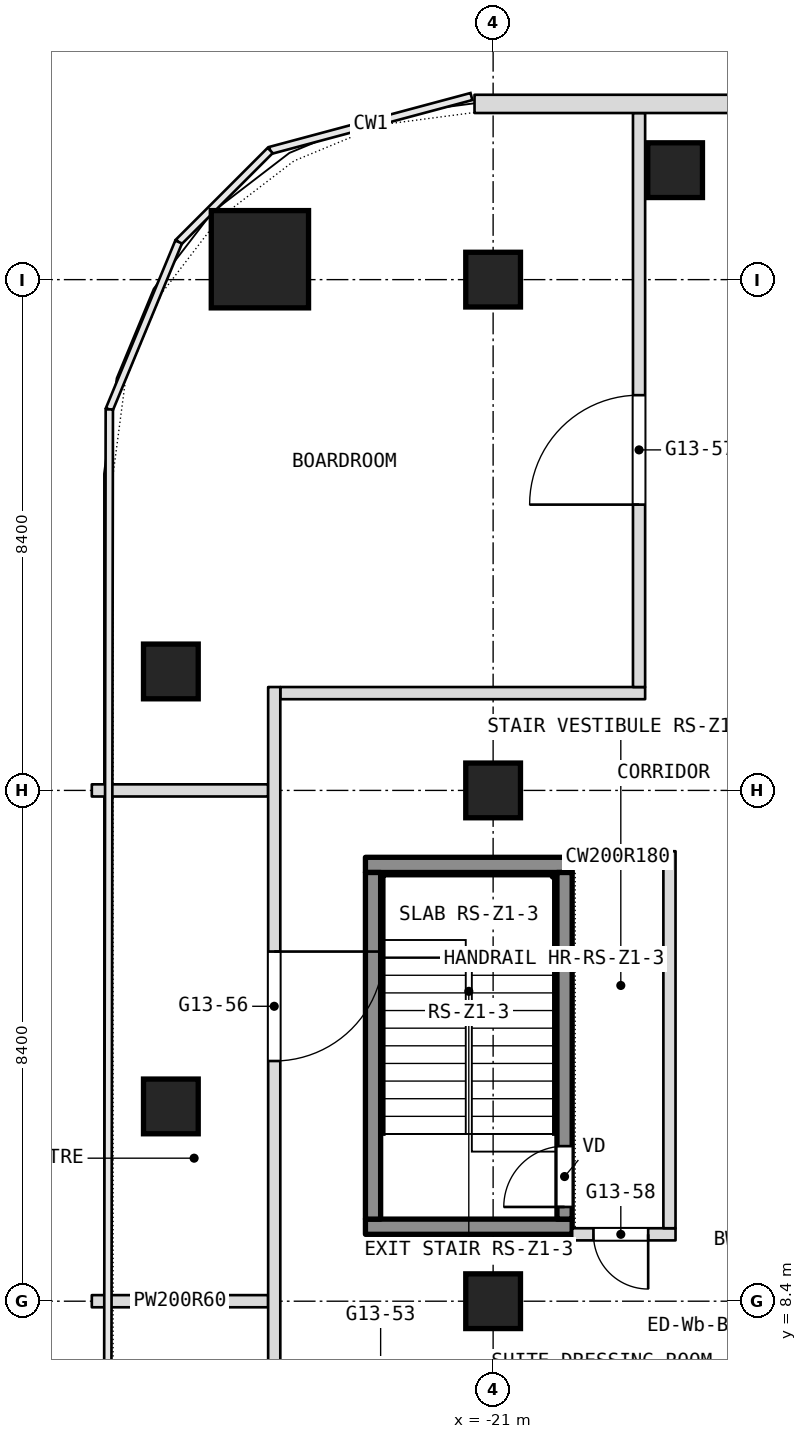
"""IFC4 building model, lengths in metres.
Left out: names, types, materials, properties, quantities, classifications, styles, units other than length and angle.
Written with IfcOpenShell. Run it as: python <this file> out.ifc"""

import sys

from ifc_helpers import new_model, si_unit, direction, frame, frame_2d, origin, origin_2d, place, context, subcontext, project, spatial, rectangle, extrude, element, fill, save


model = new_model("IFC4")
c1 = context("Model", 3, precision=1e-05, world=origin(), true_north=direction((0.0, 1.0)))
c2 = subcontext(c1, "Body", "Model", "MODEL_VIEW")
j1 = project(units=[si_unit("LENGTHUNIT", "METRE"), si_unit("PLANEANGLEUNIT", "RADIAN")], contexts=[c1])
p1 = place(None, origin())
s1 = spatial("IfcSite", under=j1, at=p1, CompositionType="ELEMENT")
p2 = place(p1, origin())
s2 = spatial("IfcBuilding", under=s1, at=p2, CompositionType="ELEMENT")
p3 = place(p2, frame((0.0, 0.0, 155.3)))
s3 = spatial("IfcBuildingStorey", under=s2, at=p3, CompositionType="ELEMENT", Elevation=155.3)
p4 = place(p3, frame((-24.835, 25.535, 0.0), z_axis=(0.0, 0.0, 1.0), x_axis=(1.0, 0.0, 0.0)))
e1 = element("IfcColumn", 1, at=p4, inside=s3, PredefinedType="COLUMN", context=c2, shape_type="SweptSolid", body=[
    extrude(rectangle(XDim=1.6, YDim=1.6, at=origin_2d()), origin(), (0.0, 0.0, 1.0), 3.6),
])
for number, where, z_axis, x_axis in (
    (2, (-21.0, 8.4, 0.0), (0.0, 0.0, 1.0), (1.0, 0.0, 0.0)),
    (3, (-21.0, 16.8, 0.0), (0.0, 0.0, 1.0), (1.0, 0.0, 0.0)),
    (4, (-21.0, 25.2, 0.0), (0.0, 0.0, 1.0), (1.0, 0.0, 0.0)),
    (5, (-26.3, 11.603, 0.0), (0.0, 0.0, 1.0), (1.0, 0.0, 0.0)),
    (6, (-26.3, 18.756, 0.0), (0.0, 0.0, 1.0), (1.0, 0.0, 0.0)),
    (7, (-18.007, 27.0, 0.0), (0.0, 0.0, 1.0), (1.0, 0.0, 0.0)),
):
    element("IfcColumn", number, at=place(p3, frame(where, z_axis=z_axis, x_axis=x_axis)), inside=s3, PredefinedType="COLUMN", context=c2, shape_type="SweptSolid", body=[
        extrude(rectangle(XDim=0.9, YDim=0.9, at=origin_2d()), origin(), (0.0, 0.0, 1.0), 3.6),
    ])
p5 = place(p3, frame((-27.6, 8.4, 0.0), z_axis=(0.0, 0.0, 1.0), x_axis=(1.0, 0.0, 0.0)))
e8 = element("IfcWall", 8, at=p5, inside=s3, PredefinedType="PARTITIONING", context=c2, shape_type="SweptSolid", body=[
    extrude(rectangle(XDim=2.9, YDim=0.2, at=frame_2d((1.45, 0.0))), origin(), (0.0, 0.0, 1.0), 2.89),
])
p6 = place(p3, frame((-19.7, 9.5, 0.0), z_axis=(0.0, 0.0, 1.0), x_axis=(1.0, 0.0, 0.0)))
e9 = element("IfcWall", 9, at=p6, inside=s3, PredefinedType="PARTITIONING", context=c2, shape_type="SweptSolid", body=[
    extrude(rectangle(XDim=1.7, YDim=0.2, at=frame_2d((0.85, 0.0))), origin(), (0.0, 0.0, 1.0), 3.34),
])
p7 = place(p6, frame((0.35, 0.0, 0.0)))
e10 = element("IfcOpeningElement", 10, at=p7, cuts=e9, PredefinedType="OPENING", context=c2, shape_type="SweptSolid", body=[
    extrude(rectangle(XDim=0.9, YDim=2.1, at=frame_2d((0.45, 1.05))), frame((0.0, 0.1, 0.0), z_axis=(0.0, -1.0, 0.0), x_axis=(1.0, 0.0, 0.0)), (0.0, 0.0, 1.0), 0.2),
])
p8 = place(p3, frame((-19.7, 15.7, 0.0), z_axis=(0.0, 0.0, 1.0), x_axis=(1.0, 0.0, 0.0)))
e11 = element("IfcWall", 11, at=p8, inside=s3, PredefinedType="PARTITIONING", context=c2, shape_type="SweptSolid", body=[
    extrude(rectangle(XDim=1.5, YDim=0.2, at=frame_2d((0.75, 0.0))), origin(), (0.0, 0.0, 1.0), 3.34),
])
p9 = place(p3, frame((-27.6, 16.8, 0.0), z_axis=(0.0, 0.0, 1.0), x_axis=(1.0, 0.0, 0.0)))
e12 = element("IfcWall", 12, at=p9, inside=s3, PredefinedType="PARTITIONING", context=c2, shape_type="SweptSolid", body=[
    extrude(rectangle(XDim=2.9, YDim=0.2, at=frame_2d((1.45, 0.0))), origin(), (0.0, 0.0, 1.0), 2.89),
])
p10 = place(p3, frame((-18.1, 9.6, 0.0), z_axis=(0.0, 0.0, 1.0), x_axis=(0.0, 1.0, 0.0)))
e13 = element("IfcWall", 13, at=p10, inside=s3, PredefinedType="PARTITIONING", context=c2, shape_type="SweptSolid", body=[
    extrude(rectangle(XDim=6.2, YDim=0.2, at=frame_2d((3.1, 0.0))), origin(), (0.0, 0.0, 1.0), 3.34),
])
p11 = place(p3, frame((-24.5, 18.4, 0.0), z_axis=(0.0, 0.0, 1.0), x_axis=(1.0, 0.0, 0.0)))
e14 = element("IfcWall", 14, at=p11, inside=s3, PredefinedType="PARTITIONING", context=c2, shape_type="SweptSolid", body=[
    extrude(rectangle(XDim=6.0, YDim=0.2, at=frame_2d((3.0, 0.0))), origin(), (0.0, 0.0, 1.0), 3.34),
])
p12 = place(p3, frame((-18.6, 18.5, 0.0), z_axis=(0.0, 0.0, 1.0), x_axis=(0.0, 1.0, 0.0)))
e15 = element("IfcWall", 15, at=p12, inside=s3, PredefinedType="PARTITIONING", context=c2, shape_type="SweptSolid", body=[
    extrude(rectangle(XDim=9.44, YDim=0.2, at=frame_2d((4.72, 0.0))), origin(), (0.0, 0.0, 1.0), 3.34),
])
p13 = place(p12, frame((3.0, 0.0, 0.0)))
e16 = element("IfcOpeningElement", 16, at=p13, cuts=e15, PredefinedType="OPENING", context=c2, shape_type="SweptSolid", body=[
    extrude(rectangle(XDim=1.8, YDim=2.1, at=frame_2d((0.9, 1.05))), frame((0.0, 0.1, 0.0), z_axis=(0.0, -1.0, 0.0), x_axis=(1.0, 0.0, 0.0)), (0.0, 0.0, 1.0), 0.2),
])
p14 = place(p3, frame((-24.6, 6.9, 0.0), z_axis=(0.0, 0.0, 1.0), x_axis=(0.0, 1.0, 0.0)))
e17 = element("IfcWall", 17, at=p14, inside=s3, PredefinedType="PARTITIONING", context=c2, shape_type="SweptSolid", body=[
    extrude(rectangle(XDim=11.6, YDim=0.2, at=frame_2d((5.8, 0.0))), origin(), (0.0, 0.0, 1.0), 3.34),
])
p15 = place(p14, frame((5.45, 0.0, 0.0)))
e18 = element("IfcOpeningElement", 18, at=p15, cuts=e17, PredefinedType="OPENING", context=c2, shape_type="SweptSolid", body=[
    extrude(rectangle(XDim=1.8, YDim=2.1, at=frame_2d((0.9, 1.05))), frame((0.0, 0.1, 0.0), z_axis=(0.0, -1.0, 0.0), x_axis=(1.0, 0.0, 0.0)), (0.0, 0.0, 1.0), 0.2),
])
p16 = place(p3, frame((21.306, 28.09, 0.0), z_axis=(0.0, 0.0, 1.0), x_axis=(-1.0, 0.0, 0.0)))
e19 = element("IfcWall", 19, at=p16, inside=s3, PredefinedType="NOTDEFINED", context=c2, shape_type="SweptSolid", body=[
    extrude(rectangle(XDim=42.612, YDim=0.3, at=frame_2d((21.306, 0.0))), origin(), (0.0, 0.0, 1.0), 3.6),
])
p17 = place(p16, frame((5.406, 0.0, 0.9)))
e20 = element("IfcOpeningElement", 20, at=p17, cuts=e19, PredefinedType="OPENING", context=c2, shape_type="SweptSolid", body=[
    extrude(rectangle(XDim=2.4, YDim=2.1, at=frame_2d((1.2, 1.05))), frame((0.0, 0.15, 0.0), z_axis=(0.0, -1.0, 0.0), x_axis=(1.0, 0.0, 0.0)), (0.0, 0.0, 1.0), 0.3),
])
p18 = place(p16, frame((9.606, 0.0, 0.9)))
e21 = element("IfcOpeningElement", 21, at=p18, cuts=e19, PredefinedType="OPENING", context=c2, shape_type="SweptSolid", body=[
    extrude(rectangle(XDim=2.4, YDim=2.1, at=frame_2d((1.2, 1.05))), frame((0.0, 0.15, 0.0), z_axis=(0.0, -1.0, 0.0), x_axis=(1.0, 0.0, 0.0)), (0.0, 0.0, 1.0), 0.3),
])
p19 = place(p16, frame((13.806, 0.0, 0.9)))
e22 = element("IfcOpeningElement", 22, at=p19, cuts=e19, PredefinedType="OPENING", context=c2, shape_type="SweptSolid", body=[
    extrude(rectangle(XDim=2.4, YDim=2.1, at=frame_2d((1.2, 1.05))), frame((0.0, 0.15, 0.0), z_axis=(0.0, -1.0, 0.0), x_axis=(1.0, 0.0, 0.0)), (0.0, 0.0, 1.0), 0.3),
])
p20 = place(p16, frame((18.006, 0.0, 0.9)))
e23 = element("IfcOpeningElement", 23, at=p20, cuts=e19, PredefinedType="OPENING", context=c2, shape_type="SweptSolid", body=[
    extrude(rectangle(XDim=2.4, YDim=2.1, at=frame_2d((1.2, 1.05))), frame((0.0, 0.15, 0.0), z_axis=(0.0, -1.0, 0.0), x_axis=(1.0, 0.0, 0.0)), (0.0, 0.0, 1.0), 0.3),
])
p21 = place(p16, frame((22.206, 0.0, 0.9)))
e24 = element("IfcOpeningElement", 24, at=p21, cuts=e19, PredefinedType="OPENING", context=c2, shape_type="SweptSolid", body=[
    extrude(rectangle(XDim=2.4, YDim=2.1, at=frame_2d((1.2, 1.05))), frame((0.0, 0.15, 0.0), z_axis=(0.0, -1.0, 0.0), x_axis=(1.0, 0.0, 0.0)), (0.0, 0.0, 1.0), 0.3),
])
p22 = place(p16, frame((26.406, 0.0, 0.9)))
e25 = element("IfcOpeningElement", 25, at=p22, cuts=e19, PredefinedType="OPENING", context=c2, shape_type="SweptSolid", body=[
    extrude(rectangle(XDim=2.4, YDim=2.1, at=frame_2d((1.2, 1.05))), frame((0.0, 0.15, 0.0), z_axis=(0.0, -1.0, 0.0), x_axis=(1.0, 0.0, 0.0)), (0.0, 0.0, 1.0), 0.3),
])
p23 = place(p16, frame((30.606, 0.0, 0.9)))
e26 = element("IfcOpeningElement", 26, at=p23, cuts=e19, PredefinedType="OPENING", context=c2, shape_type="SweptSolid", body=[
    extrude(rectangle(XDim=2.4, YDim=2.1, at=frame_2d((1.2, 1.05))), frame((0.0, 0.15, 0.0), z_axis=(0.0, -1.0, 0.0), x_axis=(1.0, 0.0, 0.0)), (0.0, 0.0, 1.0), 0.3),
])
p24 = place(p16, frame((34.806, 0.0, 0.9)))
e27 = element("IfcOpeningElement", 27, at=p24, cuts=e19, PredefinedType="OPENING", context=c2, shape_type="SweptSolid", body=[
    extrude(rectangle(XDim=2.4, YDim=2.1, at=frame_2d((1.2, 1.05))), frame((0.0, 0.15, 0.0), z_axis=(0.0, -1.0, 0.0), x_axis=(1.0, 0.0, 0.0)), (0.0, 0.0, 1.0), 0.3),
])
for number, where, z_axis, x_axis in (
    (28, (-23.1, 9.625, 0.1), (0.0, 0.0, 1.0), (1.0, 0.0, 0.0)),
    (29, (-23.1, 15.575, 0.1), (0.0, 0.0, 1.0), (1.0, 0.0, 0.0)),
):
    element("IfcWall", number, at=place(p3, frame(where, z_axis=z_axis, x_axis=x_axis)), inside=s3, PredefinedType="SHEAR", context=c2, shape_type="SweptSolid", body=[
        extrude(rectangle(XDim=3.4, YDim=0.25, at=frame_2d((1.7, 0.0))), origin(), (0.0, 0.0, 1.0), 3.6),
    ])
p25 = place(p3, frame((-22.975, 9.75, 0.1), z_axis=(0.0, 0.0, 1.0), x_axis=(0.0, 1.0, 0.0)))
e30 = element("IfcWall", 30, at=p25, inside=s3, PredefinedType="SHEAR", context=c2, shape_type="SweptSolid", body=[
    extrude(rectangle(XDim=5.7, YDim=0.25, at=frame_2d((2.85, 0.0))), origin(), (0.0, 0.0, 1.0), 3.6),
])
p26 = place(p3, frame((-19.825, 9.75, 0.1), z_axis=(0.0, 0.0, 1.0), x_axis=(0.0, 1.0, 0.0)))
e31 = element("IfcWall", 31, at=p26, inside=s3, PredefinedType="SHEAR", context=c2, shape_type="SweptSolid", body=[
    extrude(rectangle(XDim=5.7, YDim=0.25, at=frame_2d((2.85, 0.0))), origin(), (0.0, 0.0, 1.0), 3.6),
])
p27 = place(p26, frame((0.2, 0.0, 0.0)))
e32 = element("IfcOpeningElement", 32, at=p27, cuts=e31, PredefinedType="OPENING", context=c2, shape_type="SweptSolid", body=[
    extrude(rectangle(XDim=1.0, YDim=2.1, at=frame_2d((0.5, 1.05))), frame((0.0, 0.125, 0.0), z_axis=(0.0, -1.0, 0.0), x_axis=(1.0, 0.0, 0.0)), (0.0, 0.0, 1.0), 0.25),
])
p28 = place(p7, origin())
e33 = element("IfcDoor", 33, at=p28, inside=s3, OperationType="SINGLE_SWING_RIGHT", PredefinedType="DOOR", context=c2, shape_type="SweptSolid", body=[
    extrude(rectangle(XDim=0.9, YDim=2.1, at=frame_2d((0.45, 1.05))), frame((0.0, 0.025, 0.0), z_axis=(0.0, -1.0, 0.0), x_axis=(1.0, 0.0, 0.0)), (0.0, 0.0, 1.0), 0.05),
])
fill(e10, e33)
p29 = place(p13, origin())
e34 = element("IfcDoor", 34, at=p29, inside=s3, OperationType="DOUBLE_DOOR_SINGLE_SWING", PredefinedType="DOOR", context=c2, shape_type="SweptSolid", body=[
    extrude(rectangle(XDim=1.8, YDim=2.1, at=frame_2d((0.9, 1.05))), frame((0.0, 0.025, 0.0), z_axis=(0.0, -1.0, 0.0), x_axis=(1.0, 0.0, 0.0)), (0.0, 0.0, 1.0), 0.05),
])
fill(e16, e34)
p30 = place(p15, origin())
e35 = element("IfcDoor", 35, at=p30, inside=s3, OperationType="DOUBLE_DOOR_SINGLE_SWING", PredefinedType="DOOR", context=c2, shape_type="SweptSolid", body=[
    extrude(rectangle(XDim=1.8, YDim=2.1, at=frame_2d((0.9, 1.05))), frame((0.0, 0.025, 0.0), z_axis=(0.0, -1.0, 0.0), x_axis=(1.0, 0.0, 0.0)), (0.0, 0.0, 1.0), 0.05),
])
fill(e18, e35)
p31 = place(p27, origin())
e36 = element("IfcDoor", 36, at=p31, inside=s3, OperationType="SINGLE_SWING_LEFT", PredefinedType="DOOR", context=c2, shape_type="SweptSolid", body=[
    extrude(rectangle(XDim=1.0, YDim=2.1, at=frame_2d((0.5, 1.05))), frame((0.0, 0.025, 0.0), z_axis=(0.0, -1.0, 0.0), x_axis=(1.0, 0.0, 0.0)), (0.0, 0.0, 1.0), 0.05),
])
fill(e32, e36)
save(model, sys.argv[1])
